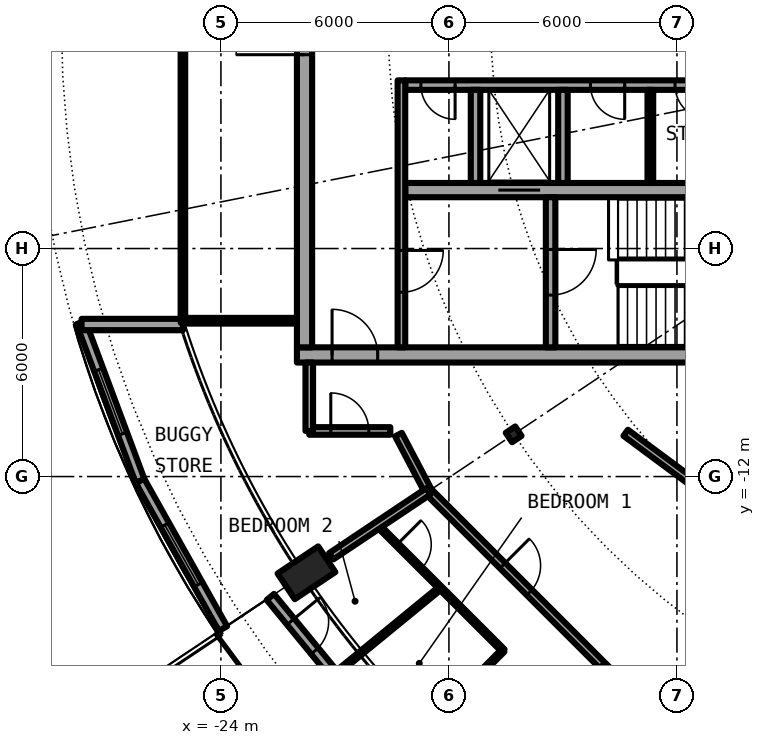
"""IFC4 building model, lengths in metres.
Left out: names, types, materials, properties, quantities, classifications, styles, units other than length and angle.
Written with IfcOpenShell. Run it as: python <this file> out.ifc"""

import sys

from ifc_helpers import new_model, si_unit, direction, frame, frame_2d, origin, origin_2d, place, context, subcontext, project, spatial, rectangle, hollow_circle, i_section, extrude, element, fill, save


model = new_model("IFC4")
c1 = context("Model", 3, precision=1e-05, world=origin(), true_north=direction((0.0, 1.0)))
c2 = subcontext(c1, "Body", "Model", "MODEL_VIEW")
j1 = project(units=[si_unit("LENGTHUNIT", "METRE"), si_unit("PLANEANGLEUNIT", "RADIAN")], contexts=[c1])
p1 = place(None, origin())
s1 = spatial("IfcSite", under=j1, at=p1, CompositionType="ELEMENT")
p2 = place(p1, origin())
s2 = spatial("IfcBuilding", under=s1, at=p2, CompositionType="ELEMENT")
p3 = place(p2, frame((0.0, 0.0, 234.05)))
s3 = spatial("IfcBuildingStorey", under=s2, at=p3, CompositionType="ELEMENT", Elevation=234.05)
p4 = place(p3, frame((-22.283, -14.889, 0.0), z_axis=(0.346913947437, 0.231777820067, 0.908806775502), x_axis=(-0.555532669549, 0.831494710184, 0.0)))
e1 = element("IfcColumn", 1, at=p4, inside=s3, PredefinedType="COLUMN", context=c2, shape_type="SweptSolid", body=[
    extrude(hollow_circle(Radius=0.406, WallThickness=0.03, at=origin_2d()), origin(), (0.0, 0.0, 1.0), 3.081),
])
p5 = place(p3, frame((-16.297, -10.889, 0.0), z_axis=(0.0, 0.0, 1.0), x_axis=(-0.831469612303, -0.55557023302, 0.0)))
e2 = element("IfcColumn", 2, at=p5, inside=s3, PredefinedType="COLUMN", context=c2, shape_type="SweptSolid", body=[
    extrude(i_section(OverallWidth=0.3, OverallDepth=0.3, WebThickness=0.011, FlangeThickness=0.019, FilletRadius=0.027, at=origin_2d()), origin(), (0.0, 0.0, 1.0), 3.05),
])
p6 = place(p3, frame((-22.699, -15.167, 0.0), z_axis=(0.0, 0.0, 1.0), x_axis=(0.634382322723, -0.773019449054, 0.0)))
e3 = element("IfcWall", 3, at=p6, inside=s3, PredefinedType="SOLIDWALL", context=c2, shape_type="SweptSolid", body=[
    extrude(rectangle(XDim=5.352, YDim=0.25, at=frame_2d((2.676, 0.0))), origin(), (0.0, 0.0, 1.0), 2.7),
])
p7 = place(p6, frame((0.841, 0.0, 0.0)))
e4 = element("IfcOpeningElement", 4, at=p7, cuts=e3, PredefinedType="OPENING", context=c2, shape_type="SweptSolid", body=[
    extrude(rectangle(XDim=1.0, YDim=2.2, at=frame_2d((0.5, 1.1))), frame((0.0, 0.135, 0.0), z_axis=(0.0, -1.0, 0.0), x_axis=(1.0, 0.0, 0.0)), (0.0, 0.0, 1.0), 0.27),
])
p8 = place(p6, frame((3.111, 0.0, 0.3)))
e5 = element("IfcOpeningElement", 5, at=p8, cuts=e3, PredefinedType="OPENING", context=c2, shape_type="SweptSolid", body=[
    extrude(rectangle(XDim=1.8, YDim=2.1, at=frame_2d((0.9, 1.05))), frame((0.0, 0.135, 0.0), z_axis=(0.0, -1.0, 0.0), x_axis=(1.0, 0.0, 0.0)), (0.0, 0.0, 1.0), 0.27),
])
p9 = place(p3, frame((-27.682, -7.945, 0.0), z_axis=(0.0, 0.0, 1.0), x_axis=(0.349247811493, -0.937030397675, 0.0)))
e6 = element("IfcWall", 6, at=p9, inside=s3, PredefinedType="SOLIDWALL", context=c2, shape_type="SweptSolid", body=[
    extrude(rectangle(XDim=4.452, YDim=0.25, at=frame_2d((2.226, 0.0))), origin(), (0.0, 0.0, 1.0), 2.7),
])
p10 = place(p9, frame((1.327, 0.0, 0.3)))
e7 = element("IfcOpeningElement", 7, at=p10, cuts=e6, PredefinedType="OPENING", context=c2, shape_type="SweptSolid", body=[
    extrude(rectangle(XDim=1.8, YDim=2.1, at=frame_2d((0.9, 1.05))), frame((0.0, 0.135, 0.0), z_axis=(0.0, -1.0, 0.0), x_axis=(1.0, 0.0, 0.0)), (0.0, 0.0, 1.0), 0.27),
])
p11 = place(p3, frame((-26.127, -12.117, 0.0), z_axis=(0.0, 0.0, 1.0), x_axis=(0.489696356642, -0.871893042919, 0.0)))
e8 = element("IfcWall", 8, at=p11, inside=s3, PredefinedType="SOLIDWALL", context=c2, shape_type="SweptSolid", body=[
    extrude(rectangle(XDim=4.454, YDim=0.25, at=frame_2d((2.227, 0.0))), origin(), (0.0, 0.0, 1.0), 2.7),
])
p12 = place(p11, frame((1.327, 0.0, 0.3)))
e9 = element("IfcOpeningElement", 9, at=p12, cuts=e8, PredefinedType="OPENING", context=c2, shape_type="SweptSolid", body=[
    extrude(rectangle(XDim=1.8, YDim=2.1, at=frame_2d((0.9, 1.05))), frame((0.0, 0.135, 0.0), z_axis=(0.0, -1.0, 0.0), x_axis=(1.0, 0.0, 0.0)), (0.0, 0.0, 1.0), 0.27),
])
p13 = place(p3, frame((-25.0, -8.0, 0.0), z_axis=(0.0, 0.0, 1.0), x_axis=(-1.0, 0.0, 0.0)))
e10 = element("IfcWall", 10, at=p13, inside=s3, PredefinedType="SOLIDWALL", context=c2, shape_type="SweptSolid", body=[
    extrude(rectangle(XDim=2.667, YDim=0.3, at=frame_2d((1.333, 0.0))), origin(), (0.0, 0.0, 1.0), 2.7),
])
p14 = place(p3, frame((-22.0, -8.8, 0.0), z_axis=(0.0, 0.0, 1.0), x_axis=(1.0, 0.0, 0.0)))
e11 = element("IfcWall", 11, at=p14, inside=s3, PredefinedType="SHEAR", context=c2, shape_type="SweptSolid", body=[
    extrude(rectangle(XDim=13.4, YDim=0.4, at=frame_2d((6.7, 0.0))), origin(), (0.0, 0.0, 1.0), 3.05),
])
p15 = place(p14, frame((0.925, 0.0, 0.0)))
e12 = element("IfcOpeningElement", 12, at=p15, cuts=e11, PredefinedType="OPENING", context=c2, shape_type="SweptSolid", body=[
    extrude(rectangle(XDim=1.2, YDim=2.3, at=frame_2d((0.6, 1.15))), frame((0.0, 0.21, 0.0), z_axis=(0.0, -1.0, 0.0), x_axis=(1.0, 0.0, 0.0)), (0.0, 0.0, 1.0), 0.42),
])
p16 = place(p3, frame((-21.8, -8.6, 0.0), z_axis=(0.0, 0.0, 1.0), x_axis=(0.0, 1.0, 0.0)))
e13 = element("IfcWall", 13, at=p16, inside=s3, PredefinedType="SHEAR", context=c2, shape_type="SweptSolid", body=[
    extrude(rectangle(XDim=17.2, YDim=0.4, at=frame_2d((8.6, 0.0))), origin(), (0.0, 0.0, 1.0), 3.05),
])
p17 = place(p16, frame((7.7, 0.0, 0.0)))
e14 = element("IfcOpeningElement", 14, at=p17, cuts=e13, PredefinedType="OPENING", context=c2, shape_type="SweptSolid", body=[
    extrude(rectangle(XDim=1.8, YDim=2.3, at=frame_2d((0.9, 1.15))), frame((0.0, 0.21, 0.0), z_axis=(0.0, -1.0, 0.0), x_axis=(1.0, 0.0, 0.0)), (0.0, 0.0, 1.0), 0.42),
])
p18 = place(p3, frame((-9.0, -1.7, 0.0), z_axis=(0.0, 0.0, 1.0), x_axis=(-1.0, 0.0, 0.0)))
e15 = element("IfcWall", 15, at=p18, inside=s3, PredefinedType="SHEAR", context=c2, shape_type="SweptSolid", body=[
    extrude(rectangle(XDim=10.15, YDim=0.25, at=frame_2d((5.075, 0.0))), origin(), (0.0, 0.0, 1.0), 3.05),
])
p19 = place(p18, frame((0.262, 0.0, 0.0)))
e16 = element("IfcOpeningElement", 16, at=p19, cuts=e15, PredefinedType="OPENING", context=c2, shape_type="SweptSolid", body=[
    extrude(rectangle(XDim=0.9, YDim=2.3, at=frame_2d((0.45, 1.15))), frame((0.0, 0.135, 0.0), z_axis=(0.0, -1.0, 0.0), x_axis=(1.0, 0.0, 0.0)), (0.0, 0.0, 1.0), 0.27),
])
p20 = place(p18, frame((2.15, 0.0, 0.0)))
e17 = element("IfcOpeningElement", 17, at=p20, cuts=e15, PredefinedType="OPENING", context=c2, shape_type="SweptSolid", body=[
    extrude(rectangle(XDim=0.9, YDim=2.3, at=frame_2d((0.45, 1.15))), frame((0.0, 0.135, 0.0), z_axis=(0.0, -1.0, 0.0), x_axis=(1.0, 0.0, 0.0)), (0.0, 0.0, 1.0), 0.27),
])
p21 = place(p18, frame((4.375, 0.0, 0.0)))
e18 = element("IfcOpeningElement", 18, at=p21, cuts=e15, PredefinedType="OPENING", context=c2, shape_type="SweptSolid", body=[
    extrude(rectangle(XDim=0.9, YDim=2.3, at=frame_2d((0.45, 1.15))), frame((0.0, 0.135, 0.0), z_axis=(0.0, -1.0, 0.0), x_axis=(1.0, 0.0, 0.0)), (0.0, 0.0, 1.0), 0.27),
])
p22 = place(p18, frame((8.837, 0.0, 0.0)))
e19 = element("IfcOpeningElement", 19, at=p22, cuts=e15, PredefinedType="OPENING", context=c2, shape_type="SweptSolid", body=[
    extrude(rectangle(XDim=0.9, YDim=2.3, at=frame_2d((0.45, 1.15))), frame((0.0, 0.135, 0.0), z_axis=(0.0, -1.0, 0.0), x_axis=(1.0, 0.0, 0.0)), (0.0, 0.0, 1.0), 0.27),
])
p23 = place(p3, frame((-9.0, -4.462, 0.0), z_axis=(0.0, 0.0, 1.0), x_axis=(-1.0, 0.0, 0.0)))
e20 = element("IfcWall", 20, at=p23, inside=s3, PredefinedType="SHEAR", context=c2, shape_type="SweptSolid", body=[
    extrude(rectangle(XDim=10.15, YDim=0.375, at=frame_2d((5.075, 0.0))), origin(), (0.0, 0.0, 1.0), 3.05),
])
p24 = place(p23, frame((6.6, 0.0, 0.0)))
e21 = element("IfcOpeningElement", 21, at=p24, cuts=e20, PredefinedType="OPENING", context=c2, shape_type="SweptSolid", body=[
    extrude(rectangle(XDim=1.1, YDim=2.3, at=frame_2d((0.55, 1.15))), frame((0.0, 0.198, 0.0), z_axis=(0.0, -1.0, 0.0), x_axis=(1.0, 0.0, 0.0)), (0.0, 0.0, 1.0), 0.395),
])
p25 = place(p3, frame((-15.325, -4.65, 0.0), z_axis=(0.0, 0.0, 1.0), x_axis=(0.0, -1.0, 0.0)))
e22 = element("IfcWall", 22, at=p25, inside=s3, PredefinedType="SHEAR", context=c2, shape_type="SweptSolid", body=[
    extrude(rectangle(XDim=3.95, YDim=0.25, at=frame_2d((1.975, 0.0))), origin(), (0.0, 0.0, 1.0), 3.05),
])
p26 = place(p25, frame((1.375, 0.0, 0.0)))
e23 = element("IfcOpeningElement", 23, at=p26, cuts=e22, PredefinedType="OPENING", context=c2, shape_type="SweptSolid", body=[
    extrude(rectangle(XDim=1.2, YDim=2.3, at=frame_2d((0.6, 1.15))), frame((0.0, 0.135, 0.0), z_axis=(0.0, -1.0, 0.0), x_axis=(1.0, 0.0, 0.0)), (0.0, 0.0, 1.0), 0.27),
])
for number, where, z_axis, x_axis in (
    (24, (-15.0, -1.825, 0.0), (0.0, 0.0, 1.0), (0.0, -1.0, 0.0)),
    (25, (-17.3, -1.825, 0.0), (0.0, 0.0, 1.0), (0.0, -1.0, 0.0)),
):
    element("IfcWall", number, at=place(p3, frame(where, z_axis=z_axis, x_axis=x_axis)), inside=s3, PredefinedType="SOLIDWALL", context=c2, shape_type="SweptSolid", body=[
        extrude(rectangle(XDim=2.45, YDim=0.25, at=frame_2d((1.225, 0.0))), origin(), (0.0, 0.0, 1.0), 2.7),
    ])
p27 = place(p3, frame((-19.25, -1.575, 0.0), z_axis=(0.0, 0.0, 1.0), x_axis=(0.0, -1.0, 0.0)))
e26 = element("IfcWall", 26, at=p27, inside=s3, PredefinedType="SOLIDWALL", context=c2, shape_type="SweptSolid", body=[
    extrude(rectangle(XDim=7.025, YDim=0.2, at=frame_2d((3.513, 0.0))), origin(), (0.0, 0.0, 1.0), 2.7),
])
p28 = place(p27, frame((4.475, 0.0, 0.0)))
e27 = element("IfcOpeningElement", 27, at=p28, cuts=e26, PredefinedType="OPENING", context=c2, shape_type="SweptSolid", body=[
    extrude(rectangle(XDim=1.1, YDim=2.3, at=frame_2d((0.55, 1.15))), frame((0.0, 0.11, 0.0), z_axis=(0.0, -1.0, 0.0), x_axis=(1.0, 0.0, 0.0)), (0.0, 0.0, 1.0), 0.22),
])
p29 = place(p3, frame((-12.7, -1.825, 0.0), z_axis=(0.0, 0.0, 1.0), x_axis=(0.0, -1.0, 0.0)))
e28 = element("IfcWall", 28, at=p29, inside=s3, PredefinedType="PARTITIONING", context=c2, shape_type="SweptSolid", body=[
    extrude(rectangle(XDim=2.45, YDim=0.15, at=frame_2d((1.225, 0.0))), origin(), (0.0, 0.0, 1.0), 2.7),
])
p30 = place(p3, frame((-22.0, -7.9, 0.0), z_axis=(0.0, 0.0, 1.0), x_axis=(-1.0, 0.0, 0.0)))
e29 = element("IfcWall", 29, at=p30, inside=s3, PredefinedType="PARTITIONING", context=c2, shape_type="SweptSolid", body=[
    extrude(rectangle(XDim=2.94, YDim=0.15, at=frame_2d((1.47, 0.0))), origin(), (0.0, 0.0, 1.0), 2.7),
])
p31 = place(p3, frame((-25.0, 7.95, 0.0), z_axis=(0.0, 0.0, 1.0), x_axis=(0.0, -1.0, 0.0)))
e30 = element("IfcWall", 30, at=p31, inside=s3, PredefinedType="PARTITIONING", context=c2, shape_type="SweptSolid", body=[
    extrude(rectangle(XDim=15.9, YDim=0.12, at=frame_2d((7.95, 0.0))), origin(), (0.0, 0.0, 1.0), 2.7),
])
p32 = place(p31, frame((0.95, 0.0, 0.1)))
e31 = element("IfcOpeningElement", 31, at=p32, cuts=e30, PredefinedType="OPENING", context=c2, shape_type="SweptSolid", body=[
    extrude(rectangle(XDim=14.0, YDim=2.35, at=frame_2d((7.0, 1.175))), frame((0.0, 0.07, 0.0), z_axis=(0.0, -1.0, 0.0), x_axis=(1.0, 0.0, 0.0)), (0.0, 0.0, 1.0), 0.14),
])
p33 = place(p3, frame((-19.869, -13.285, 0.0), z_axis=(0.0, 0.0, 1.0), x_axis=(0.707290020325, -0.706923494552, 0.0)))
e32 = element("IfcWall", 32, at=p33, inside=s3, PredefinedType="PARTITIONING", context=c2, shape_type="SweptSolid", body=[
    extrude(rectangle(XDim=4.663, YDim=0.1, at=frame_2d((2.331, 0.0))), origin(), (0.0, 0.0, 1.0), 2.7),
])
p34 = place(p33, frame((0.712, 0.0, 0.0)))
e33 = element("IfcOpeningElement", 33, at=p34, cuts=e32, PredefinedType="OPENING", context=c2, shape_type="SweptSolid", body=[
    extrude(rectangle(XDim=0.9, YDim=2.3, at=frame_2d((0.45, 1.15))), frame((0.0, 0.06, 0.0), z_axis=(0.0, -1.0, 0.0), x_axis=(1.0, 0.0, 0.0)), (0.0, 0.0, 1.0), 0.12),
])
p35 = place(p3, frame((-19.328, -10.896, 0.0), z_axis=(0.0, 0.0, 1.0), x_axis=(0.465812036273, -0.88488369115, 0.0)))
e34 = element("IfcWall", 34, at=p35, inside=s3, PredefinedType="PARTITIONING", context=c2, shape_type="SweptSolid", body=[
    extrude(rectangle(XDim=1.687, YDim=0.2, at=frame_2d((0.844, 0.0))), origin(), (0.0, 0.0, 1.0), 2.7),
])
p36 = place(p3, frame((-18.542, -12.389, 0.0), z_axis=(0.0, 0.0, 1.0), x_axis=(0.707106781187, -0.707106781187, 0.0)))
e35 = element("IfcWall", 35, at=p36, inside=s3, PredefinedType="PARTITIONING", context=c2, shape_type="SweptSolid", body=[
    extrude(rectangle(XDim=8.702, YDim=0.2, at=frame_2d((4.351, 0.0))), origin(), (0.0, 0.0, 1.0), 2.7),
])
p37 = place(p36, frame((2.763, 0.0, 0.0)))
e36 = element("IfcOpeningElement", 36, at=p37, cuts=e35, PredefinedType="OPENING", context=c2, shape_type="SweptSolid", body=[
    extrude(rectangle(XDim=1.0, YDim=2.3, at=frame_2d((0.5, 1.15))), frame((0.0, 0.11, 0.0), z_axis=(0.0, -1.0, 0.0), x_axis=(1.0, 0.0, 0.0)), (0.0, 0.0, 1.0), 0.22),
])
p38 = place(p3, frame((-13.349, -10.848, 0.0), z_axis=(0.0, 0.0, 1.0), x_axis=(0.803229232922, -0.595670042371, 0.0)))
e37 = element("IfcWall", 37, at=p38, inside=s3, PredefinedType="PARTITIONING", context=c2, shape_type="SweptSolid", body=[
    extrude(rectangle(XDim=10.224, YDim=0.2, at=frame_2d((5.112, 0.0))), origin(), (0.0, 0.0, 1.0), 2.7),
])
p39 = place(p38, frame((4.612, 0.0, 0.0)))
e38 = element("IfcOpeningElement", 38, at=p39, cuts=e37, PredefinedType="OPENING", context=c2, shape_type="SweptSolid", body=[
    extrude(rectangle(XDim=1.0, YDim=2.3, at=frame_2d((0.5, 1.15))), frame((0.0, 0.11, 0.0), z_axis=(0.0, -1.0, 0.0), x_axis=(1.0, 0.0, 0.0)), (0.0, 0.0, 1.0), 0.22),
])
p40 = place(p3, frame((-21.675, -10.8, 0.0), z_axis=(0.0, 0.0, 1.0), x_axis=(1.0, 0.0, 0.0)))
e39 = element("IfcWall", 39, at=p40, inside=s3, PredefinedType="PARTITIONING", context=c2, shape_type="SweptSolid", body=[
    extrude(rectangle(XDim=2.132, YDim=0.2, at=frame_2d((1.066, 0.0))), origin(), (0.0, 0.0, 1.0), 2.7),
])
p41 = place(p40, frame((0.566, 0.0, 0.0)))
e40 = element("IfcOpeningElement", 40, at=p41, cuts=e39, PredefinedType="OPENING", context=c2, shape_type="SweptSolid", body=[
    extrude(rectangle(XDim=1.0, YDim=2.3, at=frame_2d((0.5, 1.15))), frame((0.0, 0.11, 0.0), z_axis=(0.0, -1.0, 0.0), x_axis=(1.0, 0.0, 0.0)), (0.0, 0.0, 1.0), 0.22),
])
p42 = place(p3, frame((-21.097, -14.097, 0.0), z_axis=(0.0, 0.0, 1.0), x_axis=(0.831340764735, 0.555763018642, 0.0)))
e41 = element("IfcWall", 41, at=p42, inside=s3, PredefinedType="PARTITIONING", context=c2, shape_type="SweptSolid", body=[
    extrude(rectangle(XDim=3.073, YDim=0.2, at=frame_2d((1.537, 0.0))), origin(), (0.0, 0.0, 1.0), 2.7),
])
p43 = place(p3, frame((-21.023, -17.22, 0.0), z_axis=(0.0, 0.0, 1.0), x_axis=(0.773548271597, 0.633737383709, 0.0)))
e42 = element("IfcWall", 42, at=p43, inside=s3, PredefinedType="PARTITIONING", context=c2, shape_type="SweptSolid", body=[
    extrude(rectangle(XDim=3.618, YDim=0.1, at=frame_2d((1.809, 0.0))), origin(), (0.0, 0.0, 1.0), 2.7),
])
p44 = place(p3, frame((-19.216, -19.216, 0.0), z_axis=(0.0, 0.0, 1.0), x_axis=(0.707106781187, 0.707106781187, 0.0)))
e43 = element("IfcWall", 43, at=p44, inside=s3, PredefinedType="PARTITIONING", context=c2, shape_type="SweptSolid", body=[
    extrude(rectangle(XDim=3.735, YDim=0.1, at=frame_2d((1.868, 0.0))), origin(), (0.0, 0.0, 1.0), 2.7),
])
p45 = place(p44, frame((1.417, 0.0, 0.0)))
e44 = element("IfcOpeningElement", 44, at=p45, cuts=e43, PredefinedType="OPENING", context=c2, shape_type="SweptSolid", body=[
    extrude(rectangle(XDim=0.9, YDim=2.3, at=frame_2d((0.45, 1.15))), frame((0.0, 0.06, 0.0), z_axis=(0.0, -1.0, 0.0), x_axis=(1.0, 0.0, 0.0)), (0.0, 0.0, 1.0), 0.12),
])
p46 = place(p3, frame((-21.675, -10.8, 0.0), z_axis=(0.0, 0.0, 1.0), x_axis=(0.0, 1.0, 0.0)))
e45 = element("IfcWall", 45, at=p46, inside=s3, PredefinedType="PARTITIONING", context=c2, shape_type="SweptSolid", body=[
    extrude(rectangle(XDim=1.8, YDim=0.2, at=frame_2d((0.9, 0.0))), origin(), (0.0, 0.0, 1.0), 2.7),
])
p47 = place(p7, origin())
e46 = element("IfcDoor", 46, at=p47, inside=s3, OperationType="SINGLE_SWING_LEFT", PredefinedType="DOOR", context=c2, shape_type="SweptSolid", body=[
    extrude(rectangle(XDim=1.0, YDim=2.2, at=frame_2d((0.5, 1.1))), frame((0.0, 0.025, 0.0), z_axis=(0.0, -1.0, 0.0), x_axis=(1.0, 0.0, 0.0)), (0.0, 0.0, 1.0), 0.05),
])
fill(e4, e46)
p48 = place(p10, origin())
e47 = element("IfcWindow", 47, at=p48, inside=s3, PartitioningType="SINGLE_PANEL", PredefinedType="WINDOW", context=c2, shape_type="SweptSolid", body=[
    extrude(rectangle(XDim=1.8, YDim=2.1, at=frame_2d((0.9, 1.05))), frame((0.0, 0.03, 0.0), z_axis=(0.0, -1.0, 0.0), x_axis=(1.0, 0.0, 0.0)), (0.0, 0.0, 1.0), 0.06),
])
fill(e7, e47)
p49 = place(p12, origin())
e48 = element("IfcWindow", 48, at=p49, inside=s3, PartitioningType="SINGLE_PANEL", PredefinedType="WINDOW", context=c2, shape_type="SweptSolid", body=[
    extrude(rectangle(XDim=1.8, YDim=2.1, at=frame_2d((0.9, 1.05))), frame((0.0, 0.03, 0.0), z_axis=(0.0, -1.0, 0.0), x_axis=(1.0, 0.0, 0.0)), (0.0, 0.0, 1.0), 0.06),
])
fill(e9, e48)
p50 = place(p24, origin())
e49 = element("IfcDoor", 49, at=p50, inside=s3, OperationType="DOUBLE_DOOR_SLIDING", PredefinedType="DOOR", context=c2, shape_type="SweptSolid", body=[
    extrude(rectangle(XDim=1.1, YDim=2.3, at=frame_2d((0.55, 1.15))), frame((0.0, 0.025, 0.0), z_axis=(0.0, -1.0, 0.0), x_axis=(1.0, 0.0, 0.0)), (0.0, 0.0, 1.0), 0.05),
])
fill(e21, e49)
p51 = place(p20, origin())
e50 = element("IfcDoor", 50, at=p51, inside=s3, OperationType="SINGLE_SWING_RIGHT", PredefinedType="DOOR", context=c2, shape_type="SweptSolid", body=[
    extrude(rectangle(XDim=0.9, YDim=2.3, at=frame_2d((0.45, 1.15))), frame((0.0, 0.025, 0.0), z_axis=(0.0, -1.0, 0.0), x_axis=(1.0, 0.0, 0.0)), (0.0, 0.0, 1.0), 0.05),
])
fill(e17, e50)
p52 = place(p21, origin())
e51 = element("IfcDoor", 51, at=p52, inside=s3, OperationType="SINGLE_SWING_RIGHT", PredefinedType="DOOR", context=c2, shape_type="SweptSolid", body=[
    extrude(rectangle(XDim=0.9, YDim=2.3, at=frame_2d((0.45, 1.15))), frame((0.0, 0.025, 0.0), z_axis=(0.0, -1.0, 0.0), x_axis=(1.0, 0.0, 0.0)), (0.0, 0.0, 1.0), 0.05),
])
fill(e18, e51)
p53 = place(p22, origin())
e52 = element("IfcDoor", 52, at=p53, inside=s3, OperationType="SINGLE_SWING_LEFT", PredefinedType="DOOR", context=c2, shape_type="SweptSolid", body=[
    extrude(rectangle(XDim=0.9, YDim=2.3, at=frame_2d((0.45, 1.15))), frame((0.0, 0.025, 0.0), z_axis=(0.0, -1.0, 0.0), x_axis=(1.0, 0.0, 0.0)), (0.0, 0.0, 1.0), 0.05),
])
fill(e19, e52)
p54 = place(p26, origin())
e53 = element("IfcDoor", 53, at=p54, inside=s3, OperationType="SINGLE_SWING_LEFT", PredefinedType="DOOR", context=c2, shape_type="SweptSolid", body=[
    extrude(rectangle(XDim=1.2, YDim=2.3, at=frame_2d((0.6, 1.15))), frame((0.0, 0.025, 0.0), z_axis=(0.0, -1.0, 0.0), x_axis=(1.0, 0.0, 0.0)), (0.0, 0.0, 1.0), 0.05),
])
fill(e23, e53)
p55 = place(p28, origin())
e54 = element("IfcDoor", 54, at=p55, inside=s3, OperationType="SINGLE_SWING_LEFT", PredefinedType="DOOR", context=c2, shape_type="SweptSolid", body=[
    extrude(rectangle(XDim=1.1, YDim=2.3, at=frame_2d((0.55, 1.15))), frame((0.0, 0.025, 0.0), z_axis=(0.0, -1.0, 0.0), x_axis=(1.0, 0.0, 0.0)), (0.0, 0.0, 1.0), 0.05),
])
fill(e27, e54)
p56 = place(p15, origin())
e55 = element("IfcDoor", 55, at=p56, inside=s3, OperationType="SINGLE_SWING_RIGHT", PredefinedType="DOOR", context=c2, shape_type="SweptSolid", body=[
    extrude(rectangle(XDim=1.2, YDim=2.3, at=frame_2d((0.6, 1.15))), frame((0.0, 0.025, 0.0), z_axis=(0.0, -1.0, 0.0), x_axis=(1.0, 0.0, 0.0)), (0.0, 0.0, 1.0), 0.05),
])
fill(e12, e55)
p57 = place(p17, origin())
e56 = element("IfcDoor", 56, at=p57, inside=s3, OperationType="SINGLE_SWING_LEFT", PredefinedType="DOOR", context=c2, shape_type="SweptSolid", body=[
    extrude(rectangle(XDim=1.8, YDim=2.3, at=frame_2d((0.9, 1.15))), frame((0.0, 0.025, 0.0), z_axis=(0.0, -1.0, 0.0), x_axis=(1.0, 0.0, 0.0)), (0.0, 0.0, 1.0), 0.05),
])
fill(e14, e56)
p58 = place(p32, origin())
e57 = element("IfcWindow", 57, at=p58, inside=s3, PartitioningType="SINGLE_PANEL", PredefinedType="WINDOW", context=c2, shape_type="SweptSolid", body=[
    extrude(rectangle(XDim=14.0, YDim=2.35, at=frame_2d((7.0, 1.175))), frame((0.0, 0.03, 0.0), z_axis=(0.0, -1.0, 0.0), x_axis=(1.0, 0.0, 0.0)), (0.0, 0.0, 1.0), 0.06),
])
fill(e31, e57)
p59 = place(p37, origin())
e58 = element("IfcDoor", 58, at=p59, inside=s3, OperationType="SINGLE_SWING_LEFT", PredefinedType="DOOR", context=c2, shape_type="SweptSolid", body=[
    extrude(rectangle(XDim=1.0, YDim=2.3, at=frame_2d((0.5, 1.15))), frame((0.0, 0.025, 0.0), z_axis=(0.0, -1.0, 0.0), x_axis=(1.0, 0.0, 0.0)), (0.0, 0.0, 1.0), 0.05),
])
fill(e36, e58)
p60 = place(p34, origin())
e59 = element("IfcDoor", 59, at=p60, inside=s3, OperationType="SINGLE_SWING_LEFT", PredefinedType="DOOR", context=c2, shape_type="SweptSolid", body=[
    extrude(rectangle(XDim=0.9, YDim=2.3, at=frame_2d((0.45, 1.15))), frame((0.0, 0.025, 0.0), z_axis=(0.0, -1.0, 0.0), x_axis=(1.0, 0.0, 0.0)), (0.0, 0.0, 1.0), 0.05),
])
fill(e33, e59)
p61 = place(p41, origin())
e60 = element("IfcDoor", 60, at=p61, inside=s3, OperationType="SINGLE_SWING_LEFT", PredefinedType="DOOR", context=c2, shape_type="SweptSolid", body=[
    extrude(rectangle(XDim=1.0, YDim=2.3, at=frame_2d((0.5, 1.15))), frame((0.0, 0.025, 0.0), z_axis=(0.0, -1.0, 0.0), x_axis=(1.0, 0.0, 0.0)), (0.0, 0.0, 1.0), 0.05),
])
fill(e40, e60)
save(model, sys.argv[1])
